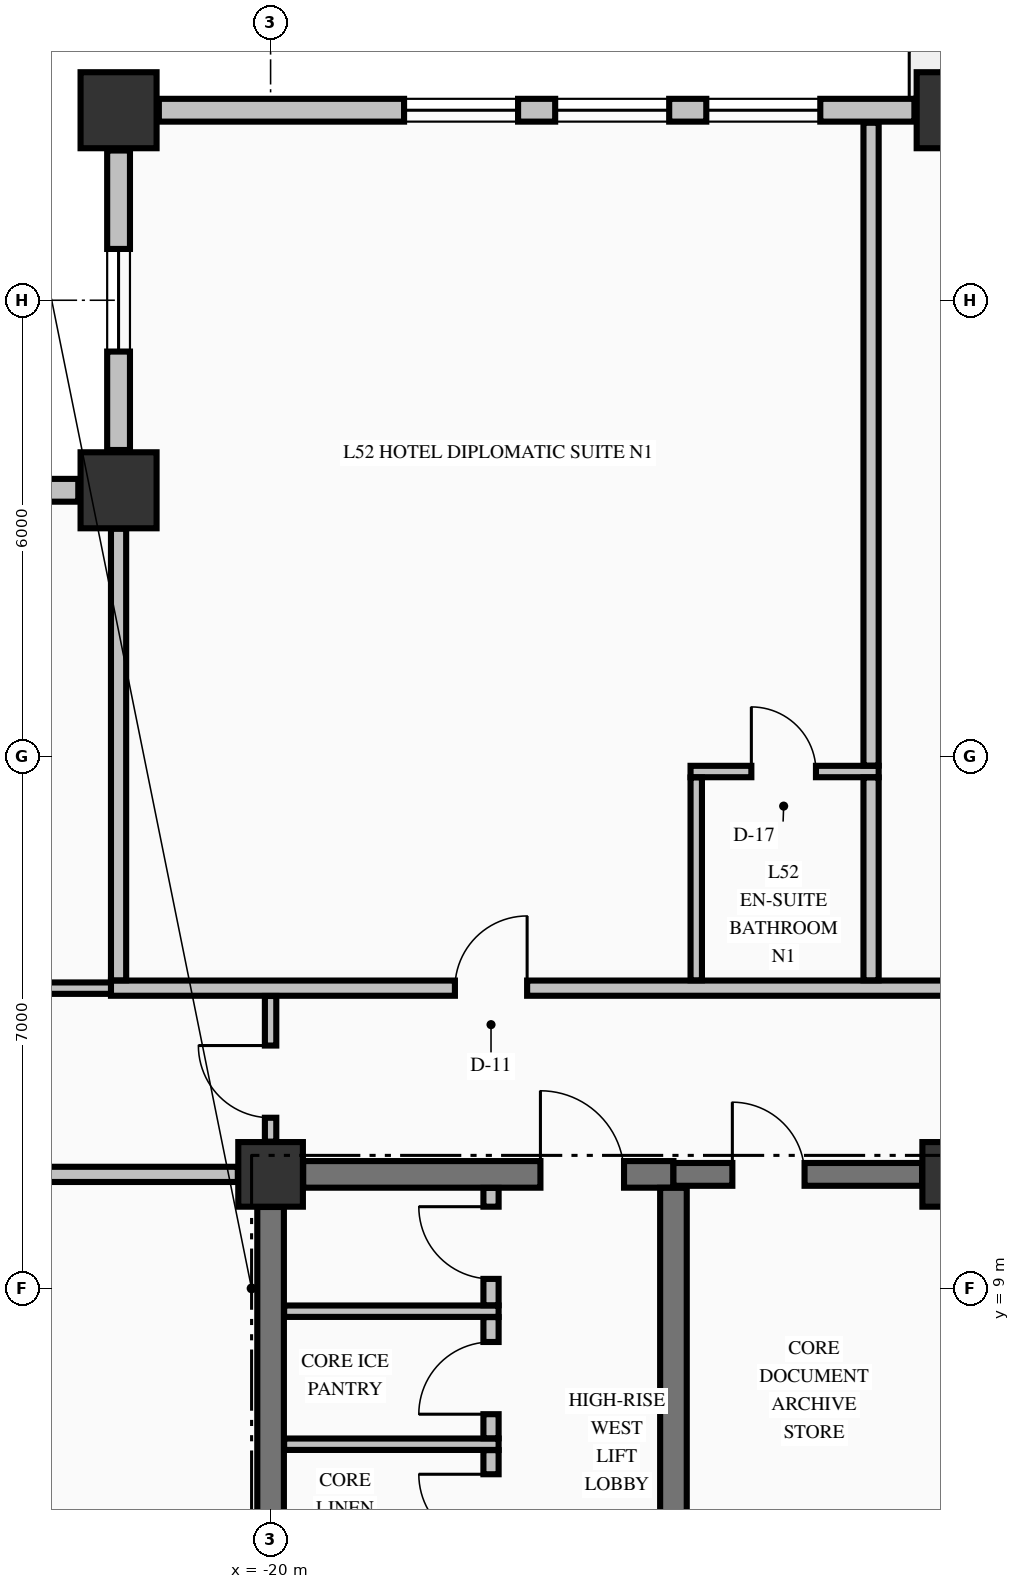
"""IFC4 building model, lengths in metres.
Left out: names, types, materials, properties, quantities, classifications, styles, units other than length and angle.
Written with IfcOpenShell. Run it as: python <this file> out.ifc"""

import sys

from ifc_helpers import new_model, si_unit, direction, frame, frame_2d, origin, origin_2d, place, context, subcontext, project, spatial, rectangle, extrude, element, fill, save


model = new_model("IFC4")
c1 = context("Model", 3, precision=1e-05, world=origin(), true_north=direction((0.0, 1.0)))
c2 = subcontext(c1, "Body", "Model", "MODEL_VIEW")
j1 = project(units=[si_unit("LENGTHUNIT", "METRE"), si_unit("PLANEANGLEUNIT", "RADIAN")], contexts=[c1])
p1 = place(None, origin())
s1 = spatial("IfcSite", under=j1, at=p1, CompositionType="ELEMENT")
p2 = place(p1, origin())
s2 = spatial("IfcBuilding", under=s1, at=p2, CompositionType="ELEMENT")
p3 = place(p2, frame((0.0, 0.0, 201.66)))
s3 = spatial("IfcBuildingStorey", under=s2, at=p3, CompositionType="ELEMENT", Elevation=201.66)
for number, where, z_axis, x_axis in (
    (1, (-22.0, 24.5, -0.25), (0.0, 0.0, 1.0), (1.0, 0.0, 0.0)),
    (2, (-11.0, 24.5, -0.25), (0.0, 0.0, 1.0), (1.0, 0.0, 0.0)),
    (3, (-22.0, 19.5, -0.25), (0.0, 0.0, 1.0), (1.0, 0.0, 0.0)),
):
    element("IfcColumn", number, at=place(p3, frame(where, z_axis=z_axis, x_axis=x_axis)), inside=s3, PredefinedType="COLUMN", context=c2, shape_type="SweptSolid", body=[
        extrude(rectangle(XDim=1.0, YDim=1.0, at=origin_2d()), origin(), (0.0, 0.0, 1.0), 3.4),
    ])
for number, where, z_axis, x_axis in (
    (4, (-20.0, 10.5, -0.25), (0.0, 0.0, 1.0), (1.0, 0.0, 0.0)),
    (5, (-11.0, 10.5, -0.25), (0.0, 0.0, 1.0), (1.0, 0.0, 0.0)),
):
    element("IfcColumn", number, at=place(p3, frame(where, z_axis=z_axis, x_axis=x_axis)), inside=s3, PredefinedType="COLUMN", context=c2, shape_type="SweptSolid", body=[
        extrude(rectangle(XDim=0.85, YDim=0.85, at=origin_2d()), origin(), (0.0, 0.0, 1.0), 3.4),
    ])
p4 = place(p3, frame((-22.0, 23.97, 0.0), z_axis=(0.0, 0.0, 1.0), x_axis=(0.0, -1.0, 0.0)))
e6 = element("IfcWall", 6, at=p4, inside=s3, PredefinedType="STANDARD", context=c2, shape_type="SweptSolid", body=[
    extrude(rectangle(XDim=3.94, YDim=0.3, at=frame_2d((1.97, 0.0))), origin(), (0.0, 0.0, 1.0), 2.542),
])
p5 = place(p4, frame((1.295, 0.0, 0.68)))
e7 = element("IfcOpeningElement", 7, at=p5, cuts=e6, PredefinedType="OPENING", context=c2, shape_type="SweptSolid", body=[
    extrude(rectangle(XDim=1.35, YDim=1.42, at=frame_2d((0.675, 0.71))), frame((0.0, 0.16, 0.0), z_axis=(0.0, -1.0, 0.0), x_axis=(1.0, 0.0, 0.0)), (0.0, 0.0, 1.0), 0.32),
])
p6 = place(p3, frame((-22.53, 19.5, 0.0), z_axis=(0.0, 0.0, 1.0), x_axis=(-1.0, 0.0, 0.0)))
e8 = element("IfcWall", 8, at=p6, inside=s3, PredefinedType="STANDARD", context=c2, shape_type="SweptSolid", body=[
    extrude(rectangle(XDim=3.94, YDim=0.3, at=frame_2d((1.97, 0.0))), origin(), (0.0, 0.0, 1.0), 2.542),
])
p7 = place(p6, frame((1.295, 0.0, 0.68)))
e9 = element("IfcOpeningElement", 9, at=p7, cuts=e8, PredefinedType="OPENING", context=c2, shape_type="SweptSolid", body=[
    extrude(rectangle(XDim=1.35, YDim=1.42, at=frame_2d((0.675, 0.71))), frame((0.0, 0.16, 0.0), z_axis=(0.0, -1.0, 0.0), x_axis=(1.0, 0.0, 0.0)), (0.0, 0.0, 1.0), 0.32),
])
p8 = place(p3, frame((-11.53, 24.5, 0.0), z_axis=(0.0, 0.0, 1.0), x_axis=(-1.0, 0.0, 0.0)))
e10 = element("IfcWall", 10, at=p8, inside=s3, PredefinedType="STANDARD", context=c2, shape_type="SweptSolid", body=[
    extrude(rectangle(XDim=9.94, YDim=0.3, at=frame_2d((4.97, 0.0))), origin(), (0.0, 0.0, 1.0), 2.542),
])
p9 = place(p8, frame((1.238, 0.0, 0.72)))
e11 = element("IfcOpeningElement", 11, at=p9, cuts=e10, PredefinedType="OPENING", context=c2, shape_type="SweptSolid", body=[
    extrude(rectangle(XDim=1.5, YDim=1.6, at=frame_2d((0.75, 0.8))), frame((0.0, 0.16, 0.0), z_axis=(0.0, -1.0, 0.0), x_axis=(1.0, 0.0, 0.0)), (0.0, 0.0, 1.0), 0.32),
])
p10 = place(p8, frame((3.226, 0.0, 0.72)))
e12 = element("IfcOpeningElement", 12, at=p10, cuts=e10, PredefinedType="OPENING", context=c2, shape_type="SweptSolid", body=[
    extrude(rectangle(XDim=1.5, YDim=1.6, at=frame_2d((0.75, 0.8))), frame((0.0, 0.16, 0.0), z_axis=(0.0, -1.0, 0.0), x_axis=(1.0, 0.0, 0.0)), (0.0, 0.0, 1.0), 0.32),
])
p11 = place(p8, frame((5.214, 0.0, 0.72)))
e13 = element("IfcOpeningElement", 13, at=p11, cuts=e10, PredefinedType="OPENING", context=c2, shape_type="SweptSolid", body=[
    extrude(rectangle(XDim=1.5, YDim=1.6, at=frame_2d((0.75, 0.8))), frame((0.0, 0.16, 0.0), z_axis=(0.0, -1.0, 0.0), x_axis=(1.0, 0.0, 0.0)), (0.0, 0.0, 1.0), 0.32),
])
p12 = place(p3, frame((-19.571, 10.5, 0.0), z_axis=(0.0, 0.0, 1.0), x_axis=(1.0, 0.0, 0.0)))
e14 = element("IfcWall", 14, at=p12, inside=s3, PredefinedType="SHEAR", context=c2, shape_type="SweptSolid", body=[
    extrude(rectangle(XDim=4.871, YDim=0.35, at=frame_2d((2.436, 0.0))), origin(), (0.0, 0.0, 1.0), 3.15),
])
p13 = place(p12, frame((3.121, 0.0, 0.0)))
e15 = element("IfcOpeningElement", 15, at=p13, cuts=e14, PredefinedType="OPENING", context=c2, shape_type="SweptSolid", body=[
    extrude(rectangle(XDim=1.1, YDim=2.15, at=frame_2d((0.55, 1.075))), frame((0.0, 0.185, 0.0), z_axis=(0.0, -1.0, 0.0), x_axis=(1.0, 0.0, 0.0)), (0.0, 0.0, 1.0), 0.37),
])
p14 = place(p3, frame((-14.7, 10.5, 0.0), z_axis=(0.0, 0.0, 1.0), x_axis=(1.0, 0.0, 0.0)))
e16 = element("IfcWall", 16, at=p14, inside=s3, PredefinedType="SHEAR", context=c2, shape_type="SweptSolid", body=[
    extrude(rectangle(XDim=3.271, YDim=0.3, at=frame_2d((1.635, 0.0))), origin(), (0.0, 0.0, 1.0), 3.15),
])
p15 = place(p14, frame((0.775, 0.0, 0.0)))
e17 = element("IfcOpeningElement", 17, at=p15, cuts=e16, PredefinedType="OPENING", context=c2, shape_type="SweptSolid", body=[
    extrude(rectangle(XDim=0.95, YDim=2.15, at=frame_2d((0.475, 1.075))), frame((0.0, 0.16, 0.0), z_axis=(0.0, -1.0, 0.0), x_axis=(1.0, 0.0, 0.0)), (0.0, 0.0, 1.0), 0.32),
])
for number, where, z_axis, x_axis in (
    (18, (-19.822, 6.95, 0.0), (0.0, 0.0, 1.0), (1.0, 0.0, 0.0)),
    (19, (-19.822, 8.7, 0.0), (0.0, 0.0, 1.0), (1.0, 0.0, 0.0)),
):
    element("IfcWall", number, at=place(p3, frame(where, z_axis=z_axis, x_axis=x_axis)), inside=s3, PredefinedType="PARTITIONING", context=c2, shape_type="SweptSolid", body=[
        extrude(rectangle(XDim=2.822, YDim=0.15, at=frame_2d((1.411, 0.0))), origin(), (0.0, 0.0, 1.0), 3.15),
    ])
p16 = place(p3, frame((-26.835, 10.5, 0.0), z_axis=(0.0, 0.0, 1.0), x_axis=(1.0, 0.0, 0.0)))
e20 = element("IfcWall", 20, at=p16, inside=s3, PredefinedType="PARTITIONING", context=c2, shape_type="SweptSolid", body=[
    extrude(rectangle(XDim=6.404, YDim=0.2, at=frame_2d((3.202, 0.0))), origin(), (0.0, 0.0, 1.0), 3.15),
])
p17 = place(p16, frame((2.86, 0.0, 0.0)))
e21 = element("IfcOpeningElement", 21, at=p17, cuts=e20, PredefinedType="OPENING", context=c2, shape_type="SweptSolid", body=[
    extrude(rectangle(XDim=0.95, YDim=2.15, at=frame_2d((0.475, 1.075))), frame((0.0, 0.11, 0.0), z_axis=(0.0, -1.0, 0.0), x_axis=(1.0, 0.0, 0.0)), (0.0, 0.0, 1.0), 0.22),
])
p18 = place(p3, frame((-26.835, 12.95, 0.0), z_axis=(0.0, 0.0, 1.0), x_axis=(1.0, 0.0, 0.0)))
e22 = element("IfcWall", 22, at=p18, inside=s3, PredefinedType="PARTITIONING", context=c2, shape_type="SweptSolid", body=[
    extrude(rectangle(XDim=4.935, YDim=0.15, at=frame_2d((2.468, 0.0))), origin(), (0.0, 0.0, 1.0), 3.15),
])
p19 = place(p3, frame((-22.1, 12.95, 0.0), z_axis=(0.0, 0.0, 1.0), x_axis=(1.0, 0.0, 0.0)))
e23 = element("IfcWall", 23, at=p19, inside=s3, PredefinedType="PARTITIONING", context=c2, shape_type="SweptSolid", body=[
    extrude(rectangle(XDim=39.2, YDim=0.2, at=frame_2d((19.6, 0.0))), origin(), (0.0, 0.0, 1.0), 3.15),
])
p20 = place(p19, frame((4.525, 0.0, 0.0)))
e24 = element("IfcOpeningElement", 24, at=p20, cuts=e23, PredefinedType="OPENING", context=c2, shape_type="SweptSolid", body=[
    extrude(rectangle(XDim=0.95, YDim=2.15, at=frame_2d((0.475, 1.075))), frame((0.0, 0.11, 0.0), z_axis=(0.0, -1.0, 0.0), x_axis=(1.0, 0.0, 0.0)), (0.0, 0.0, 1.0), 0.22),
])
p21 = place(p19, frame((12.475, 0.0, 0.0)))
e25 = element("IfcOpeningElement", 25, at=p21, cuts=e23, PredefinedType="OPENING", context=c2, shape_type="SweptSolid", body=[
    extrude(rectangle(XDim=0.95, YDim=2.15, at=frame_2d((0.475, 1.075))), frame((0.0, 0.11, 0.0), z_axis=(0.0, -1.0, 0.0), x_axis=(1.0, 0.0, 0.0)), (0.0, 0.0, 1.0), 0.22),
])
p22 = place(p19, frame((22.175, 0.0, 0.0)))
e26 = element("IfcOpeningElement", 26, at=p22, cuts=e23, PredefinedType="OPENING", context=c2, shape_type="SweptSolid", body=[
    extrude(rectangle(XDim=0.95, YDim=2.15, at=frame_2d((0.475, 1.075))), frame((0.0, 0.11, 0.0), z_axis=(0.0, -1.0, 0.0), x_axis=(1.0, 0.0, 0.0)), (0.0, 0.0, 1.0), 0.22),
])
p23 = place(p19, frame((34.675, 0.0, 0.0)))
e27 = element("IfcOpeningElement", 27, at=p23, cuts=e23, PredefinedType="OPENING", context=c2, shape_type="SweptSolid", body=[
    extrude(rectangle(XDim=0.95, YDim=2.15, at=frame_2d((0.475, 1.075))), frame((0.0, 0.11, 0.0), z_axis=(0.0, -1.0, 0.0), x_axis=(1.0, 0.0, 0.0)), (0.0, 0.0, 1.0), 0.22),
])
p24 = place(p3, frame((-14.475, 15.8, 0.0), z_axis=(0.0, 0.0, 1.0), x_axis=(1.0, 0.0, 0.0)))
e28 = element("IfcWall", 28, at=p24, inside=s3, PredefinedType="PARTITIONING", context=c2, shape_type="SweptSolid", body=[
    extrude(rectangle(XDim=2.475, YDim=0.15, at=frame_2d((1.238, 0.0))), origin(), (0.0, 0.0, 1.0), 3.15),
])
p25 = place(p24, frame((0.8, 0.0, 0.0)))
e29 = element("IfcOpeningElement", 29, at=p25, cuts=e28, PredefinedType="OPENING", context=c2, shape_type="SweptSolid", body=[
    extrude(rectangle(XDim=0.85, YDim=2.1, at=frame_2d((0.425, 1.05))), frame((0.0, 0.085, 0.0), z_axis=(0.0, -1.0, 0.0), x_axis=(1.0, 0.0, 0.0)), (0.0, 0.0, 1.0), 0.17),
])
p26 = place(p3, frame((-20.0, 5.327, 0.0), z_axis=(0.0, 0.0, 1.0), x_axis=(0.0, 1.0, 0.0)))
e30 = element("IfcWall", 30, at=p26, inside=s3, PredefinedType="SHEAR", context=c2, shape_type="SweptSolid", body=[
    extrude(rectangle(XDim=4.744, YDim=0.35, at=frame_2d((2.372, 0.0))), origin(), (0.0, 0.0, 1.0), 3.15),
])
p27 = place(p3, frame((-14.7, 5.852, 0.0), z_axis=(0.0, 0.0, 1.0), x_axis=(0.0, 1.0, 0.0)))
e31 = element("IfcWall", 31, at=p27, inside=s3, PredefinedType="SHEAR", context=c2, shape_type="SweptSolid", body=[
    extrude(rectangle(XDim=4.471, YDim=0.35, at=frame_2d((2.235, 0.0))), origin(), (0.0, 0.0, 1.0), 3.15),
])
p28 = place(p3, frame((-22.0, 13.053, 0.0), z_axis=(0.0, 0.0, 1.0), x_axis=(0.0, 1.0, 0.0)))
e32 = element("IfcWall", 32, at=p28, inside=s3, PredefinedType="PARTITIONING", context=c2, shape_type="SweptSolid", body=[
    extrude(rectangle(XDim=5.941, YDim=0.2, at=frame_2d((2.97, 0.0))), origin(), (0.0, 0.0, 1.0), 3.15),
])
p29 = place(p3, frame((-20.0, 10.931, 0.0), z_axis=(0.0, 0.0, 1.0), x_axis=(0.0, 1.0, 0.0)))
e33 = element("IfcWall", 33, at=p29, inside=s3, PredefinedType="PARTITIONING", context=c2, shape_type="SweptSolid", body=[
    extrude(rectangle(XDim=1.916, YDim=0.15, at=frame_2d((0.958, 0.0))), origin(), (0.0, 0.0, 1.0), 2.342),
])
p30 = place(p29, frame((0.314, 0.0, 0.0)))
e34 = element("IfcOpeningElement", 34, at=p30, cuts=e33, PredefinedType="OPENING", context=c2, shape_type="SweptSolid", body=[
    extrude(rectangle(XDim=0.95, YDim=2.15, at=frame_2d((0.475, 1.075))), frame((0.0, 0.085, 0.0), z_axis=(0.0, -1.0, 0.0), x_axis=(1.0, 0.0, 0.0)), (0.0, 0.0, 1.0), 0.17),
])
p31 = place(p3, frame((-17.1, 5.328, 0.0), z_axis=(0.0, 0.0, 1.0), x_axis=(0.0, 1.0, 0.0)))
e35 = element("IfcWall", 35, at=p31, inside=s3, PredefinedType="PARTITIONING", context=c2, shape_type="SweptSolid", body=[
    extrude(rectangle(XDim=1.544, YDim=0.2, at=frame_2d((0.772, 0.0))), origin(), (0.0, 0.0, 1.0), 3.15),
])
p32 = place(p31, frame((0.277, 0.0, 0.0)))
e36 = element("IfcOpeningElement", 36, at=p32, cuts=e35, PredefinedType="OPENING", context=c2, shape_type="SweptSolid", body=[
    extrude(rectangle(XDim=0.95, YDim=2.15, at=frame_2d((0.475, 1.075))), frame((0.0, 0.11, 0.0), z_axis=(0.0, -1.0, 0.0), x_axis=(1.0, 0.0, 0.0)), (0.0, 0.0, 1.0), 0.22),
])
p33 = place(p3, frame((-17.1, 7.028, 0.0), z_axis=(0.0, 0.0, 1.0), x_axis=(0.0, 1.0, 0.0)))
e37 = element("IfcWall", 37, at=p33, inside=s3, PredefinedType="PARTITIONING", context=c2, shape_type="SweptSolid", body=[
    extrude(rectangle(XDim=1.594, YDim=0.2, at=frame_2d((0.797, 0.0))), origin(), (0.0, 0.0, 1.0), 3.15),
])
p34 = place(p33, frame((0.317, 0.0, 0.0)))
e38 = element("IfcOpeningElement", 38, at=p34, cuts=e37, PredefinedType="OPENING", context=c2, shape_type="SweptSolid", body=[
    extrude(rectangle(XDim=0.95, YDim=2.15, at=frame_2d((0.475, 1.075))), frame((0.0, 0.11, 0.0), z_axis=(0.0, -1.0, 0.0), x_axis=(1.0, 0.0, 0.0)), (0.0, 0.0, 1.0), 0.22),
])
p35 = place(p3, frame((-17.1, 8.778, 0.0), z_axis=(0.0, 0.0, 1.0), x_axis=(0.0, 1.0, 0.0)))
e39 = element("IfcWall", 39, at=p35, inside=s3, PredefinedType="PARTITIONING", context=c2, shape_type="SweptSolid", body=[
    extrude(rectangle(XDim=1.544, YDim=0.2, at=frame_2d((0.772, 0.0))), origin(), (0.0, 0.0, 1.0), 3.15),
])
p36 = place(p35, frame((0.347, 0.0, 0.0)))
e40 = element("IfcOpeningElement", 40, at=p36, cuts=e39, PredefinedType="OPENING", context=c2, shape_type="SweptSolid", body=[
    extrude(rectangle(XDim=0.95, YDim=2.15, at=frame_2d((0.475, 1.075))), frame((0.0, 0.11, 0.0), z_axis=(0.0, -1.0, 0.0), x_axis=(1.0, 0.0, 0.0)), (0.0, 0.0, 1.0), 0.22),
])
p37 = place(p3, frame((-14.4, 13.053, 0.0), z_axis=(0.0, 0.0, 1.0), x_axis=(0.0, 1.0, 0.0)))
e41 = element("IfcWall", 41, at=p37, inside=s3, PredefinedType="PARTITIONING", context=c2, shape_type="SweptSolid", body=[
    extrude(rectangle(XDim=2.669, YDim=0.15, at=frame_2d((1.334, 0.0))), origin(), (0.0, 0.0, 1.0), 3.15),
])
p38 = place(p3, frame((-12.1, 13.053, 0.0), z_axis=(0.0, 0.0, 1.0), x_axis=(0.0, 1.0, 0.0)))
e42 = element("IfcWall", 42, at=p38, inside=s3, PredefinedType="PARTITIONING", context=c2, shape_type="SweptSolid", body=[
    extrude(rectangle(XDim=2.669, YDim=0.2, at=frame_2d((1.334, 0.0))), origin(), (0.0, 0.0, 1.0), 3.15),
])
p39 = place(p3, frame((-12.1, 15.878, 0.0), z_axis=(0.0, 0.0, 1.0), x_axis=(0.0, 1.0, 0.0)))
e43 = element("IfcWall", 43, at=p39, inside=s3, PredefinedType="PARTITIONING", context=c2, shape_type="SweptSolid", body=[
    extrude(rectangle(XDim=8.457, YDim=0.2, at=frame_2d((4.229, 0.0))), origin(), (0.0, 0.0, 1.0), 3.15),
])
p40 = place(p5, origin())
e44 = element("IfcWindow", 44, at=p40, inside=s3, PartitioningType="SINGLE_PANEL", PredefinedType="WINDOW", context=c2, shape_type="SweptSolid", body=[
    extrude(rectangle(XDim=1.35, YDim=1.42, at=frame_2d((0.675, 0.71))), frame((0.0, 0.03, 0.0), z_axis=(0.0, -1.0, 0.0), x_axis=(1.0, 0.0, 0.0)), (0.0, 0.0, 1.0), 0.06),
])
fill(e7, e44)
p41 = place(p9, origin())
e45 = element("IfcWindow", 45, at=p41, inside=s3, PartitioningType="SINGLE_PANEL", PredefinedType="WINDOW", context=c2, shape_type="SweptSolid", body=[
    extrude(rectangle(XDim=1.5, YDim=1.6, at=frame_2d((0.75, 0.8))), frame((0.0, 0.03, 0.0), z_axis=(0.0, -1.0, 0.0), x_axis=(1.0, 0.0, 0.0)), (0.0, 0.0, 1.0), 0.06),
])
fill(e11, e45)
p42 = place(p10, origin())
e46 = element("IfcWindow", 46, at=p42, inside=s3, PartitioningType="SINGLE_PANEL", PredefinedType="WINDOW", context=c2, shape_type="SweptSolid", body=[
    extrude(rectangle(XDim=1.5, YDim=1.6, at=frame_2d((0.75, 0.8))), frame((0.0, 0.03, 0.0), z_axis=(0.0, -1.0, 0.0), x_axis=(1.0, 0.0, 0.0)), (0.0, 0.0, 1.0), 0.06),
])
fill(e12, e46)
p43 = place(p11, origin())
e47 = element("IfcWindow", 47, at=p43, inside=s3, PartitioningType="SINGLE_PANEL", PredefinedType="WINDOW", context=c2, shape_type="SweptSolid", body=[
    extrude(rectangle(XDim=1.5, YDim=1.6, at=frame_2d((0.75, 0.8))), frame((0.0, 0.03, 0.0), z_axis=(0.0, -1.0, 0.0), x_axis=(1.0, 0.0, 0.0)), (0.0, 0.0, 1.0), 0.06),
])
fill(e13, e47)
p44 = place(p15, origin())
e48 = element("IfcDoor", 48, at=p44, inside=s3, OperationType="SINGLE_SWING_LEFT", PredefinedType="DOOR", context=c2, shape_type="SweptSolid", body=[
    extrude(rectangle(XDim=0.95, YDim=2.15, at=frame_2d((0.475, 1.075))), frame((0.0, 0.025, 0.0), z_axis=(0.0, -1.0, 0.0), x_axis=(1.0, 0.0, 0.0)), (0.0, 0.0, 1.0), 0.05),
])
fill(e17, e48)
p45 = place(p13, origin())
e49 = element("IfcDoor", 49, at=p45, inside=s3, OperationType="SINGLE_SWING_LEFT", PredefinedType="DOOR", context=c2, shape_type="SweptSolid", body=[
    extrude(rectangle(XDim=1.1, YDim=2.15, at=frame_2d((0.55, 1.075))), frame((0.0, 0.025, 0.0), z_axis=(0.0, -1.0, 0.0), x_axis=(1.0, 0.0, 0.0)), (0.0, 0.0, 1.0), 0.05),
])
fill(e15, e49)
p46 = place(p36, origin())
e50 = element("IfcDoor", 50, at=p46, inside=s3, OperationType="SINGLE_SWING_RIGHT", PredefinedType="DOOR", context=c2, shape_type="SweptSolid", body=[
    extrude(rectangle(XDim=0.95, YDim=2.15, at=frame_2d((0.475, 1.075))), frame((0.0, 0.025, 0.0), z_axis=(0.0, -1.0, 0.0), x_axis=(1.0, 0.0, 0.0)), (0.0, 0.0, 1.0), 0.05),
])
fill(e40, e50)
p47 = place(p34, origin())
e51 = element("IfcDoor", 51, at=p47, inside=s3, OperationType="SINGLE_SWING_LEFT", PredefinedType="DOOR", context=c2, shape_type="SweptSolid", body=[
    extrude(rectangle(XDim=0.95, YDim=2.15, at=frame_2d((0.475, 1.075))), frame((0.0, 0.025, 0.0), z_axis=(0.0, -1.0, 0.0), x_axis=(1.0, 0.0, 0.0)), (0.0, 0.0, 1.0), 0.05),
])
fill(e38, e51)
p48 = place(p32, origin())
e52 = element("IfcDoor", 52, at=p48, inside=s3, OperationType="SINGLE_SWING_RIGHT", PredefinedType="DOOR", context=c2, shape_type="SweptSolid", body=[
    extrude(rectangle(XDim=0.95, YDim=2.15, at=frame_2d((0.475, 1.075))), frame((0.0, 0.025, 0.0), z_axis=(0.0, -1.0, 0.0), x_axis=(1.0, 0.0, 0.0)), (0.0, 0.0, 1.0), 0.05),
])
fill(e36, e52)
p49 = place(p20, origin())
e53 = element("IfcDoor", 53, at=p49, inside=s3, OperationType="SINGLE_SWING_RIGHT", PredefinedType="DOOR", context=c2, shape_type="SweptSolid", body=[
    extrude(rectangle(XDim=0.95, YDim=2.15, at=frame_2d((0.475, 1.075))), frame((0.0, 0.025, 0.0), z_axis=(0.0, -1.0, 0.0), x_axis=(1.0, 0.0, 0.0)), (0.0, 0.0, 1.0), 0.05),
])
fill(e24, e53)
p50 = place(p25, origin())
e54 = element("IfcDoor", 54, at=p50, inside=s3, OperationType="SINGLE_SWING_LEFT", PredefinedType="DOOR", context=c2, shape_type="SweptSolid", body=[
    extrude(rectangle(XDim=0.85, YDim=2.1, at=frame_2d((0.425, 1.05))), frame((0.0, 0.025, 0.0), z_axis=(0.0, -1.0, 0.0), x_axis=(1.0, 0.0, 0.0)), (0.0, 0.0, 1.0), 0.05),
])
fill(e29, e54)
p51 = place(p30, origin())
e55 = element("IfcDoor", 55, at=p51, inside=s3, OperationType="SINGLE_SWING_RIGHT", PredefinedType="DOOR", context=c2, shape_type="SweptSolid", body=[
    extrude(rectangle(XDim=0.95, YDim=2.15, at=frame_2d((0.475, 1.075))), frame((0.0, 0.025, 0.0), z_axis=(0.0, -1.0, 0.0), x_axis=(1.0, 0.0, 0.0)), (0.0, 0.0, 1.0), 0.05),
])
fill(e34, e55)
save(model, sys.argv[1])
